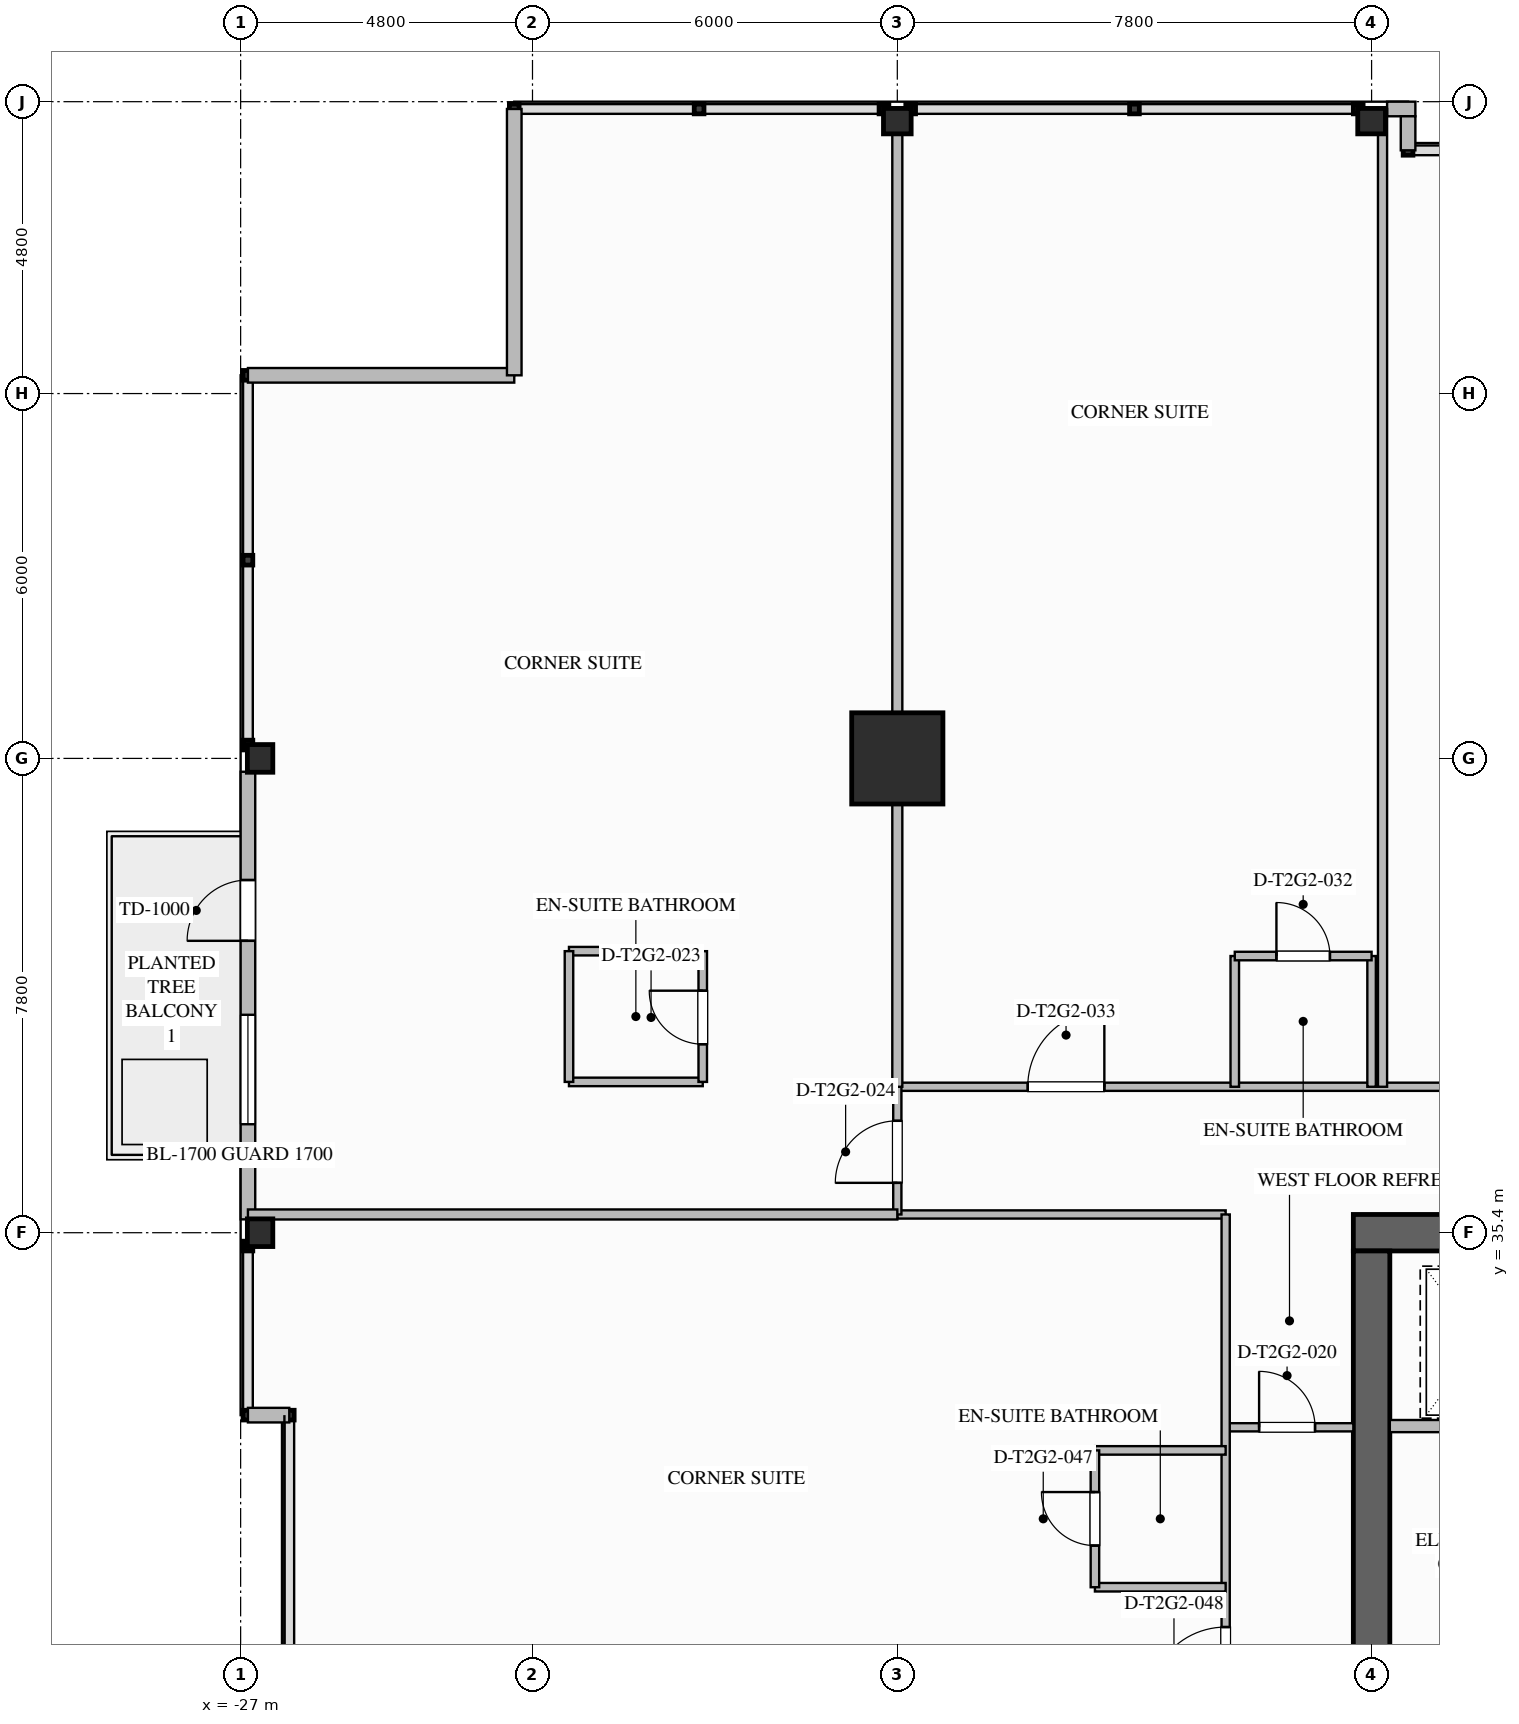
"""IFC4 building model, lengths in metres.
Left out: names, types, materials, properties, quantities, classifications, styles, units other than length and angle.
Written with IfcOpenShell. Run it as: python <this file> out.ifc"""

import sys

from ifc_helpers import new_model, si_unit, direction, frame, frame_2d, origin, origin_2d, place, context, subcontext, project, spatial, rectangle, i_section, extrude, element, fill, save


model = new_model("IFC4")
c1 = context("Model", 3, precision=1e-05, world=origin(), true_north=direction((0.0, 1.0)))
c2 = subcontext(c1, "Body", "Model", "MODEL_VIEW")
j1 = project(units=[si_unit("LENGTHUNIT", "METRE"), si_unit("PLANEANGLEUNIT", "RADIAN")], contexts=[c1])
p1 = place(None, origin())
s1 = spatial("IfcSite", under=j1, at=p1, CompositionType="ELEMENT")
p2 = place(p1, origin())
s2 = spatial("IfcBuilding", under=s1, at=p2, CompositionType="ELEMENT")
p3 = place(p2, frame((0.0, 0.0, 102.3)))
s3 = spatial("IfcBuildingStorey", under=s2, at=p3, CompositionType="ELEMENT", Elevation=102.3)
p4 = place(p3, frame((-8.7, 35.4, 0.0), z_axis=(0.0, 0.0, 1.0), x_axis=(1.0, 0.0, 0.0)))
e1 = element("IfcWall", 1, at=p4, inside=s3, PredefinedType="SHEAR", context=c2, shape_type="SweptSolid", body=[
    extrude(rectangle(XDim=17.4, YDim=0.6, at=frame_2d((8.7, 0.0))), origin(), (0.0, 0.0, 1.0), 3.5),
])
p5 = place(p3, frame((-8.4, 18.9, 0.0), z_axis=(0.0, 0.0, 1.0), x_axis=(0.0, 1.0, 0.0)))
e2 = element("IfcWall", 2, at=p5, inside=s3, PredefinedType="SHEAR", context=c2, shape_type="SweptSolid", body=[
    extrude(rectangle(XDim=16.2, YDim=0.6, at=frame_2d((8.1, 0.0))), origin(), (0.0, 0.0, 1.0), 3.5),
])
p6 = place(p5, frame((4.5, 0.0, 0.0)))
e3 = element("IfcOpeningElement", 3, at=p6, cuts=e2, PredefinedType="OPENING", context=c2, shape_type="SweptSolid", body=[
    extrude(rectangle(XDim=1.08, YDim=2.04, at=frame_2d((0.54, 1.02))), frame((0.0, 0.31, 0.0), z_axis=(0.0, -1.0, 0.0), x_axis=(1.0, 0.0, 0.0)), (0.0, 0.0, 1.0), 0.62),
])
p7 = place(p3, frame((-16.2, 43.2, 0.0), z_axis=(0.0, 0.0, 1.0), x_axis=(1.0, 0.0, 0.0)))
e4 = element("IfcColumn", 4, at=p7, inside=s3, PredefinedType="COLUMN", context=c2, shape_type="SweptSolid", body=[
    extrude(rectangle(XDim=1.5, YDim=1.5, at=origin_2d()), origin(), (0.0, 0.0, 1.0), 3.5),
])
for number, where, z_axis, x_axis in (
    (5, (-26.68, 35.4, 0.0), (0.0, 0.0, 1.0), (1.0, 0.0, 0.0)),
    (6, (-26.68, 43.2, 0.0), (0.0, 0.0, 1.0), (1.0, 0.0, 0.0)),
    (7, (-16.2, 53.68, 0.0), (0.0, 0.0, 1.0), (0.0, 1.0, 0.0)),
    (8, (-8.4, 53.68, 0.0), (0.0, 0.0, 1.0), (0.0, 1.0, 0.0)),
):
    element("IfcColumn", number, at=place(p3, frame(where, z_axis=z_axis, x_axis=x_axis)), inside=s3, PredefinedType="COLUMN", context=c2, shape_type="SweptSolid", body=[
        extrude(i_section(OverallWidth=0.418, OverallDepth=0.455, WebThickness=0.042, FlangeThickness=0.068, FilletRadius=0.03, at=origin_2d()), origin(), (0.0, 0.0, 1.0), 3.497),
    ])
p8 = place(p3, frame((-26.88, 35.62, 0.0), z_axis=(0.0, 0.0, 1.0), x_axis=(0.0, 1.0, 0.0)))
e9 = element("IfcWall", 9, at=p8, inside=s3, PredefinedType="STANDARD", context=c2, shape_type="SweptSolid", body=[
    extrude(rectangle(XDim=7.361, YDim=0.24, at=frame_2d((3.68, 0.0))), origin(), (0.0, 0.0, 1.0), 2.629),
])
p9 = place(p8, frame((4.58, 0.0, 0.0)))
e10 = element("IfcOpeningElement", 10, at=p9, cuts=e9, PredefinedType="OPENING", context=c2, shape_type="SweptSolid", body=[
    extrude(rectangle(XDim=1.0, YDim=2.2, at=frame_2d((0.5, 1.1))), frame((0.0, 0.13, 0.0), z_axis=(0.0, -1.0, 0.0), x_axis=(1.0, 0.0, 0.0)), (0.0, 0.0, 1.0), 0.26),
])
p10 = place(p8, frame((1.564, 0.0, 0.75)))
e11 = element("IfcOpeningElement", 11, at=p10, cuts=e9, PredefinedType="OPENING", context=c2, shape_type="SweptSolid", body=[
    extrude(rectangle(XDim=1.8, YDim=1.779, at=frame_2d((0.9, 0.89))), frame((0.0, 0.13, 0.0), z_axis=(0.0, -1.0, 0.0), x_axis=(1.0, 0.0, 0.0)), (0.0, 0.0, 1.0), 0.26),
])
p11 = place(p3, frame((-8.145, 53.88, 0.0), z_axis=(0.0, 0.0, 1.0), x_axis=(1.0, 0.0, 0.0)))
e12 = element("IfcWall", 12, at=p11, inside=s3, PredefinedType="STANDARD", context=c2, shape_type="SweptSolid", body=[
    extrude(rectangle(XDim=0.465, YDim=0.24, at=frame_2d((0.232, 0.0))), origin(), (0.0, 0.0, 1.0), 3.24),
])
for number, where, z_axis, x_axis in (
    (13, (-26.88, 49.5, 0.0), (0.0, 0.0, 1.0), (1.0, 0.0, 0.0)),
    (14, (-22.5, 49.5, 0.0), (0.0, 0.0, 1.0), (0.0, 1.0, 0.0)),
):
    element("IfcWall", number, at=place(p3, frame(where, z_axis=z_axis, x_axis=x_axis)), inside=s3, PredefinedType="STANDARD", context=c2, shape_type="SweptSolid", body=[
        extrude(rectangle(XDim=4.38, YDim=0.24, at=frame_2d((2.19, 0.0))), origin(), (0.0, 0.0, 1.0), 3.24),
    ])
p12 = place(p3, frame((-26.2, 32.4, 0.0), z_axis=(0.0, 0.0, 1.0), x_axis=(-1.0, 0.0, 0.0)))
e15 = element("IfcWall", 15, at=p12, inside=s3, PredefinedType="STANDARD", context=c2, shape_type="SweptSolid", body=[
    extrude(rectangle(XDim=0.68, YDim=0.24, at=frame_2d((0.34, 0.0))), origin(), (0.0, 0.0, 1.0), 3.24),
])
p13 = place(p3, frame((-7.8, 53.76, 0.0), z_axis=(0.0, 0.0, 1.0), x_axis=(0.0, -1.0, 0.0)))
e16 = element("IfcWall", 16, at=p13, inside=s3, PredefinedType="STANDARD", context=c2, shape_type="SweptSolid", body=[
    extrude(rectangle(XDim=0.56, YDim=0.24, at=frame_2d((0.28, 0.0))), origin(), (0.0, 0.0, 1.0), 3.24),
])
p14 = place(p3, frame((-8.1, 32.22, 0.0), z_axis=(0.0, 0.0, 1.0), x_axis=(1.0, 0.0, 0.0)))
e17 = element("IfcWall", 17, at=p14, inside=s3, PredefinedType="SOLIDWALL", context=c2, shape_type="SweptSolid", body=[
    extrude(rectangle(XDim=7.1, YDim=0.2, at=frame_2d((3.55, 0.0))), origin(), (0.0, 0.0, 1.0), 3.24),
])
p15 = place(p3, frame((-10.8, 32.2, 0.0), z_axis=(0.0, 0.0, 1.0), x_axis=(1.0, 0.0, 0.0)))
e18 = element("IfcWall", 18, at=p15, inside=s3, PredefinedType="PARTITIONING", context=c2, shape_type="SweptSolid", body=[
    extrude(rectangle(XDim=2.1, YDim=0.135, at=frame_2d((1.05, 0.0))), origin(), (0.0, 0.0, 1.0), 3.24),
])
p16 = place(p15, frame((0.55, 0.0, 0.0)))
e19 = element("IfcOpeningElement", 19, at=p16, cuts=e18, PredefinedType="OPENING", context=c2, shape_type="SweptSolid", body=[
    extrude(rectangle(XDim=0.92, YDim=2.1, at=frame_2d((0.46, 1.05))), frame((0.0, 0.077, 0.0), z_axis=(0.0, -1.0, 0.0), x_axis=(1.0, 0.0, 0.0)), (0.0, 0.0, 1.0), 0.155),
])
p17 = place(p3, frame((-16.2, 35.7, 0.0), z_axis=(0.0, 0.0, 1.0), x_axis=(1.0, 0.0, 0.0)))
e20 = element("IfcWall", 20, at=p17, inside=s3, PredefinedType="PARTITIONING", context=c2, shape_type="SweptSolid", body=[
    extrude(rectangle(XDim=5.4, YDim=0.135, at=frame_2d((2.7, 0.0))), origin(), (0.0, 0.0, 1.0), 3.24),
])
p18 = place(p3, frame((-16.2, 37.8, 0.0), z_axis=(0.0, 0.0, 1.0), x_axis=(1.0, 0.0, 0.0)))
e21 = element("IfcWall", 21, at=p18, inside=s3, PredefinedType="PARTITIONING", context=c2, shape_type="SweptSolid", body=[
    extrude(rectangle(XDim=24.9, YDim=0.135, at=frame_2d((12.45, 0.0))), origin(), (0.0, 0.0, 1.0), 3.24),
])
p19 = place(p18, frame((2.145, 0.0, 0.0)))
e22 = element("IfcOpeningElement", 22, at=p19, cuts=e21, PredefinedType="OPENING", context=c2, shape_type="SweptSolid", body=[
    extrude(rectangle(XDim=1.26, YDim=2.2, at=frame_2d((0.63, 1.1))), frame((0.0, 0.077, 0.0), z_axis=(0.0, -1.0, 0.0), x_axis=(1.0, 0.0, 0.0)), (0.0, 0.0, 1.0), 0.155),
])
p20 = place(p18, frame((11.187, 0.0, 0.0)))
e23 = element("IfcOpeningElement", 23, at=p20, cuts=e21, PredefinedType="OPENING", context=c2, shape_type="SweptSolid", body=[
    extrude(rectangle(XDim=1.02, YDim=2.15, at=frame_2d((0.51, 1.075))), frame((0.0, 0.077, 0.0), z_axis=(0.0, -1.0, 0.0), x_axis=(1.0, 0.0, 0.0)), (0.0, 0.0, 1.0), 0.155),
])
p21 = place(p18, frame((18.312, 0.0, 0.0)))
e24 = element("IfcOpeningElement", 24, at=p21, cuts=e21, PredefinedType="OPENING", context=c2, shape_type="SweptSolid", body=[
    extrude(rectangle(XDim=1.26, YDim=2.2, at=frame_2d((0.63, 1.1))), frame((0.0, 0.077, 0.0), z_axis=(0.0, -1.0, 0.0), x_axis=(1.0, 0.0, 0.0)), (0.0, 0.0, 1.0), 0.155),
])
p22 = place(p3, frame((-10.8, 18.3, 0.0), z_axis=(0.0, 0.0, 1.0), x_axis=(0.0, 1.0, 0.0)))
e25 = element("IfcWall", 25, at=p22, inside=s3, PredefinedType="PARTITIONING", context=c2, shape_type="SweptSolid", body=[
    extrude(rectangle(XDim=17.4, YDim=0.135, at=frame_2d((8.7, 0.0))), origin(), (0.0, 0.0, 1.0), 3.24),
])
p23 = place(p22, frame((4.355, 0.0, 0.0)))
e26 = element("IfcOpeningElement", 26, at=p23, cuts=e25, PredefinedType="OPENING", context=c2, shape_type="SweptSolid", body=[
    extrude(rectangle(XDim=1.26, YDim=2.2, at=frame_2d((0.63, 1.1))), frame((0.0, 0.077, 0.0), z_axis=(0.0, -1.0, 0.0), x_axis=(1.0, 0.0, 0.0)), (0.0, 0.0, 1.0), 0.155),
])
p24 = place(p22, frame((9.355, 0.0, 0.0)))
e27 = element("IfcOpeningElement", 27, at=p24, cuts=e25, PredefinedType="OPENING", context=c2, shape_type="SweptSolid", body=[
    extrude(rectangle(XDim=1.26, YDim=2.2, at=frame_2d((0.63, 1.1))), frame((0.0, 0.077, 0.0), z_axis=(0.0, -1.0, 0.0), x_axis=(1.0, 0.0, 0.0)), (0.0, 0.0, 1.0), 0.155),
])
p25 = place(p3, frame((-16.2, 35.7, 0.0), z_axis=(0.0, 0.0, 1.0), x_axis=(0.0, 1.0, 0.0)))
e28 = element("IfcWall", 28, at=p25, inside=s3, PredefinedType="PARTITIONING", context=c2, shape_type="SweptSolid", body=[
    extrude(rectangle(XDim=2.1, YDim=0.135, at=frame_2d((1.05, 0.0))), origin(), (0.0, 0.0, 1.0), 2.452),
])
p26 = place(p25, frame((0.52, 0.0, 0.0)))
e29 = element("IfcOpeningElement", 29, at=p26, cuts=e28, PredefinedType="OPENING", context=c2, shape_type="SweptSolid", body=[
    extrude(rectangle(XDim=1.02, YDim=2.15, at=frame_2d((0.51, 1.075))), frame((0.0, 0.077, 0.0), z_axis=(0.0, -1.0, 0.0), x_axis=(1.0, 0.0, 0.0)), (0.0, 0.0, 1.0), 0.155),
])
p27 = place(p3, frame((-16.2, 37.8, 0.0), z_axis=(0.0, 0.0, 1.0), x_axis=(0.0, 1.0, 0.0)))
e30 = element("IfcWall", 30, at=p27, inside=s3, PredefinedType="PARTITIONING", context=c2, shape_type="SweptSolid", body=[
    extrude(rectangle(XDim=16.08, YDim=0.165, at=frame_2d((8.04, 0.0))), origin(), (0.0, 0.0, 1.0), 2.452),
])
p28 = place(p3, frame((-26.88, 35.7, 0.0), z_axis=(0.0, 0.0, 1.0), x_axis=(1.0, 0.0, 0.0)))
e31 = element("IfcWall", 31, at=p28, inside=s3, PredefinedType="PARTITIONING", context=c2, shape_type="SweptSolid", body=[
    extrude(rectangle(XDim=10.68, YDim=0.165, at=frame_2d((5.34, 0.0))), origin(), (0.0, 0.0, 1.0), 2.452),
])
for number, where, z_axis, x_axis in (
    (32, (-21.6, 37.88, 0.0), (0.0, 0.0, 1.0), (1.0, 0.0, 0.0)),
    (33, (-21.6, 40.03, 0.0), (0.0, 0.0, 1.0), (1.0, 0.0, 0.0)),
):
    element("IfcWall", number, at=place(p3, frame(where, z_axis=z_axis, x_axis=x_axis)), inside=s3, PredefinedType="PLUMBINGWALL", context=c2, shape_type="SweptSolid", body=[
        extrude(rectangle(XDim=2.2, YDim=0.14, at=frame_2d((1.1, 0.0))), origin(), (0.0, 0.0, 1.0), 3.24),
    ])
p29 = place(p3, frame((-21.6, 37.88, 0.0), z_axis=(0.0, 0.0, 1.0), x_axis=(0.0, 1.0, 0.0)))
e34 = element("IfcWall", 34, at=p29, inside=s3, PredefinedType="PLUMBINGWALL", context=c2, shape_type="SweptSolid", body=[
    extrude(rectangle(XDim=2.15, YDim=0.14, at=frame_2d((1.075, 0.0))), origin(), (0.0, 0.0, 1.0), 3.24),
])
p30 = place(p3, frame((-19.4, 37.88, 0.0), z_axis=(0.0, 0.0, 1.0), x_axis=(0.0, 1.0, 0.0)))
e35 = element("IfcWall", 35, at=p30, inside=s3, PredefinedType="PLUMBINGWALL", context=c2, shape_type="SweptSolid", body=[
    extrude(rectangle(XDim=2.15, YDim=0.14, at=frame_2d((1.075, 0.0))), origin(), (0.0, 0.0, 1.0), 3.24),
])
p31 = place(p30, frame((0.62, 0.0, 0.0)))
e36 = element("IfcOpeningElement", 36, at=p31, cuts=e35, PredefinedType="OPENING", context=c2, shape_type="SweptSolid", body=[
    extrude(rectangle(XDim=0.88, YDim=2.1, at=frame_2d((0.44, 1.05))), frame((0.0, 0.08, 0.0), z_axis=(0.0, -1.0, 0.0), x_axis=(1.0, 0.0, 0.0)), (0.0, 0.0, 1.0), 0.16),
])
p32 = place(p3, frame((-10.65, 37.8, 0.0), z_axis=(0.0, 0.0, 1.0), x_axis=(0.0, 1.0, 0.0)))
e37 = element("IfcWall", 37, at=p32, inside=s3, PredefinedType="PLUMBINGWALL", context=c2, shape_type="SweptSolid", body=[
    extrude(rectangle(XDim=2.15, YDim=0.14, at=frame_2d((1.075, 0.0))), origin(), (0.0, 0.0, 1.0), 3.24),
])
p33 = place(p3, frame((-8.4, 37.8, 0.0), z_axis=(0.0, 0.0, 1.0), x_axis=(0.0, 1.0, 0.0)))
e38 = element("IfcWall", 38, at=p33, inside=s3, PredefinedType="PLUMBINGWALL", context=c2, shape_type="SweptSolid", body=[
    extrude(rectangle(XDim=2.15, YDim=0.14, at=frame_2d((1.075, 0.0))), origin(), (0.0, 0.0, 1.0), 2.617),
])
p34 = place(p3, frame((-10.65, 39.95, 0.0), z_axis=(0.0, 0.0, 1.0), x_axis=(1.0, 0.0, 0.0)))
e39 = element("IfcWall", 39, at=p34, inside=s3, PredefinedType="PLUMBINGWALL", context=c2, shape_type="SweptSolid", body=[
    extrude(rectangle(XDim=2.25, YDim=0.14, at=frame_2d((1.125, 0.0))), origin(), (0.0, 0.0, 1.0), 3.24),
])
p35 = place(p34, frame((0.685, 0.0, 0.0)))
e40 = element("IfcOpeningElement", 40, at=p35, cuts=e39, PredefinedType="OPENING", context=c2, shape_type="SweptSolid", body=[
    extrude(rectangle(XDim=0.88, YDim=2.1, at=frame_2d((0.44, 1.05))), frame((0.0, 0.08, 0.0), z_axis=(0.0, -1.0, 0.0), x_axis=(1.0, 0.0, 0.0)), (0.0, 0.0, 1.0), 0.16),
])
p36 = place(p3, frame((-8.22, 37.8, 0.0), z_axis=(0.0, 0.0, 1.0), x_axis=(0.0, 1.0, 0.0)))
e41 = element("IfcWall", 41, at=p36, inside=s3, PredefinedType="PARTITIONING", context=c2, shape_type="SweptSolid", body=[
    extrude(rectangle(XDim=16.08, YDim=0.15, at=frame_2d((8.04, 0.0))), origin(), (0.0, 0.0, 1.0), 2.452),
])
for number, where, z_axis, x_axis in (
    (42, (-10.8, 29.57, 0.0), (0.0, 0.0, 1.0), (-1.0, 0.0, 0.0)),
    (43, (-10.8, 31.82, 0.0), (0.0, 0.0, 1.0), (-1.0, 0.0, 0.0)),
):
    element("IfcWall", number, at=place(p3, frame(where, z_axis=z_axis, x_axis=x_axis)), inside=s3, PredefinedType="PLUMBINGWALL", context=c2, shape_type="SweptSolid", body=[
        extrude(rectangle(XDim=2.15, YDim=0.14, at=frame_2d((1.075, 0.0))), origin(), (0.0, 0.0, 1.0), 3.24),
    ])
p37 = place(p3, frame((-12.95, 29.57, 0.0), z_axis=(0.0, 0.0, 1.0), x_axis=(0.0, 1.0, 0.0)))
e44 = element("IfcWall", 44, at=p37, inside=s3, PredefinedType="PLUMBINGWALL", context=c2, shape_type="SweptSolid", body=[
    extrude(rectangle(XDim=2.25, YDim=0.14, at=frame_2d((1.125, 0.0))), origin(), (0.0, 0.0, 1.0), 3.24),
])
p38 = place(p37, frame((0.685, 0.0, 0.0)))
e45 = element("IfcOpeningElement", 45, at=p38, cuts=e44, PredefinedType="OPENING", context=c2, shape_type="SweptSolid", body=[
    extrude(rectangle(XDim=0.88, YDim=2.1, at=frame_2d((0.44, 1.05))), frame((0.0, 0.08, 0.0), z_axis=(0.0, -1.0, 0.0), x_axis=(1.0, 0.0, 0.0)), (0.0, 0.0, 1.0), 0.16),
])
p39 = place(p9, origin())
e46 = element("IfcDoor", 46, at=p39, inside=s3, OperationType="SINGLE_SWING_LEFT", PredefinedType="DOOR", context=c2, shape_type="SweptSolid", body=[
    extrude(rectangle(XDim=1.0, YDim=2.2, at=frame_2d((0.5, 1.1))), frame((0.0, 0.025, 0.0), z_axis=(0.0, -1.0, 0.0), x_axis=(1.0, 0.0, 0.0)), (0.0, 0.0, 1.0), 0.05),
])
fill(e10, e46)
p40 = place(p10, origin())
e47 = element("IfcWindow", 47, at=p40, inside=s3, PartitioningType="SINGLE_PANEL", PredefinedType="WINDOW", context=c2, shape_type="SweptSolid", body=[
    extrude(rectangle(XDim=1.8, YDim=1.779, at=frame_2d((0.9, 0.89))), frame((0.0, 0.03, 0.0), z_axis=(0.0, -1.0, 0.0), x_axis=(1.0, 0.0, 0.0)), (0.0, 0.0, 1.0), 0.06),
])
fill(e11, e47)
p41 = place(p16, origin())
e48 = element("IfcDoor", 48, at=p41, inside=s3, OperationType="SINGLE_SWING_LEFT", PredefinedType="DOOR", context=c2, shape_type="SweptSolid", body=[
    extrude(rectangle(XDim=0.92, YDim=2.1, at=frame_2d((0.46, 1.05))), frame((0.0, 0.025, 0.0), z_axis=(0.0, -1.0, 0.0), x_axis=(1.0, 0.0, 0.0)), (0.0, 0.0, 1.0), 0.05),
])
fill(e19, e48)
p42 = place(p31, origin())
e49 = element("IfcDoor", 49, at=p42, inside=s3, OperationType="SINGLE_SWING_RIGHT", PredefinedType="DOOR", context=c2, shape_type="SweptSolid", body=[
    extrude(rectangle(XDim=0.88, YDim=2.1, at=frame_2d((0.44, 1.05))), frame((0.0, 0.025, 0.0), z_axis=(0.0, -1.0, 0.0), x_axis=(1.0, 0.0, 0.0)), (0.0, 0.0, 1.0), 0.05),
])
fill(e36, e49)
p43 = place(p26, origin())
e50 = element("IfcDoor", 50, at=p43, inside=s3, OperationType="SINGLE_SWING_LEFT", PredefinedType="DOOR", context=c2, shape_type="SweptSolid", body=[
    extrude(rectangle(XDim=1.02, YDim=2.15, at=frame_2d((0.51, 1.075))), frame((0.0, 0.025, 0.0), z_axis=(0.0, -1.0, 0.0), x_axis=(1.0, 0.0, 0.0)), (0.0, 0.0, 1.0), 0.05),
])
fill(e29, e50)
p44 = place(p35, origin())
e51 = element("IfcDoor", 51, at=p44, inside=s3, OperationType="SINGLE_SWING_LEFT", PredefinedType="DOOR", context=c2, shape_type="SweptSolid", body=[
    extrude(rectangle(XDim=0.88, YDim=2.1, at=frame_2d((0.44, 1.05))), frame((0.0, 0.025, 0.0), z_axis=(0.0, -1.0, 0.0), x_axis=(1.0, 0.0, 0.0)), (0.0, 0.0, 1.0), 0.05),
])
fill(e40, e51)
p45 = place(p19, origin())
e52 = element("IfcDoor", 52, at=p45, inside=s3, OperationType="SINGLE_SWING_RIGHT", PredefinedType="DOOR", context=c2, shape_type="SweptSolid", body=[
    extrude(rectangle(XDim=1.26, YDim=2.2, at=frame_2d((0.63, 1.1))), frame((0.0, 0.025, 0.0), z_axis=(0.0, -1.0, 0.0), x_axis=(1.0, 0.0, 0.0)), (0.0, 0.0, 1.0), 0.05),
])
fill(e22, e52)
p46 = place(p38, origin())
e53 = element("IfcDoor", 53, at=p46, inside=s3, OperationType="SINGLE_SWING_RIGHT", PredefinedType="DOOR", context=c2, shape_type="SweptSolid", body=[
    extrude(rectangle(XDim=0.88, YDim=2.1, at=frame_2d((0.44, 1.05))), frame((0.0, 0.025, 0.0), z_axis=(0.0, -1.0, 0.0), x_axis=(1.0, 0.0, 0.0)), (0.0, 0.0, 1.0), 0.05),
])
fill(e45, e53)
p47 = place(p24, origin())
e54 = element("IfcDoor", 54, at=p47, inside=s3, OperationType="SINGLE_SWING_LEFT", PredefinedType="DOOR", context=c2, shape_type="SweptSolid", body=[
    extrude(rectangle(XDim=1.26, YDim=2.2, at=frame_2d((0.63, 1.1))), frame((0.0, 0.025, 0.0), z_axis=(0.0, -1.0, 0.0), x_axis=(1.0, 0.0, 0.0)), (0.0, 0.0, 1.0), 0.05),
])
fill(e27, e54)
save(model, sys.argv[1])
